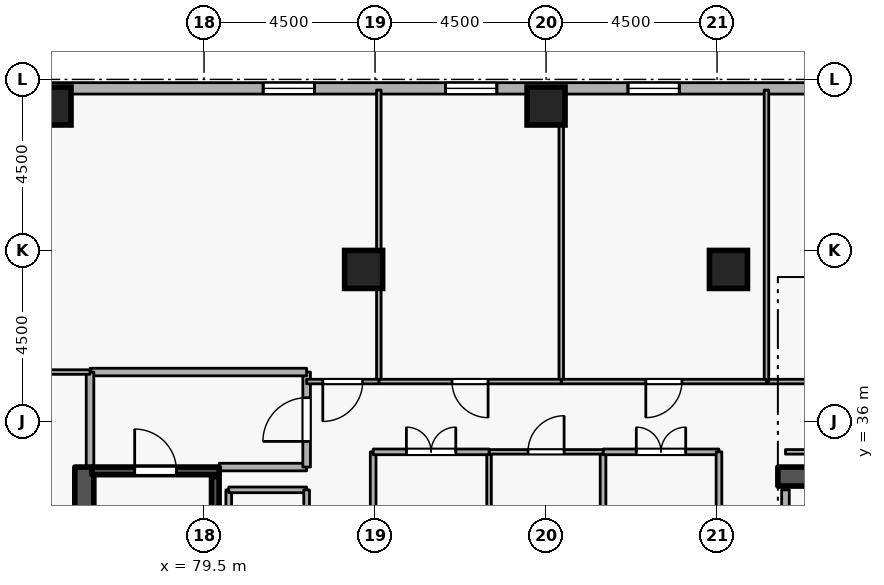
"""IFC4 building model, lengths in metres.
Left out: names, types, materials, properties, quantities, classifications, styles, units other than length and angle.
Written with IfcOpenShell. Run it as: python <this file> out.ifc"""

import sys

from ifc_helpers import new_model, si_unit, direction, frame, frame_2d, origin, origin_2d, place, context, subcontext, project, spatial, rectangle, extrude, element, fill, save


model = new_model("IFC4")
c1 = context("Model", 3, precision=1e-05, world=origin(), true_north=direction((0.0, 1.0)))
c2 = subcontext(c1, "Body", "Model", "MODEL_VIEW")
j1 = project(units=[si_unit("LENGTHUNIT", "METRE"), si_unit("PLANEANGLEUNIT", "RADIAN")], contexts=[c1])
p1 = place(None, origin())
s1 = spatial("IfcSite", under=j1, at=p1, CompositionType="ELEMENT")
p2 = place(p1, origin())
s2 = spatial("IfcBuilding", under=s1, at=p2, CompositionType="ELEMENT")
p3 = place(p2, frame((0.0, 0.0, 218.1)))
s3 = spatial("IfcBuildingStorey", under=s2, at=p3, CompositionType="ELEMENT", Elevation=218.1)
p4 = place(p3, frame((94.6, 34.55, 0.0), z_axis=(0.0, 0.0, 1.0), x_axis=(1.0, 0.0, 0.0)))
e1 = element("IfcWall", 1, at=p4, inside=s3, PredefinedType="SHEAR", context=c2, shape_type="SweptSolid", body=[
    extrude(rectangle(XDim=5.8, YDim=0.5, at=frame_2d((2.9, 0.0))), origin(), (0.0, 0.0, 1.0), 3.6),
])
p5 = place(p3, frame((76.35, 19.2, 0.0), z_axis=(0.0, 0.0, 1.0), x_axis=(0.0, 1.0, 0.0)))
e2 = element("IfcWall", 2, at=p5, inside=s3, PredefinedType="SHEAR", context=c2, shape_type="SweptSolid", body=[
    extrude(rectangle(XDim=15.6, YDim=0.5, at=frame_2d((7.8, 0.0))), origin(), (0.0, 0.0, 1.0), 3.6),
])
for number, where, z_axis, x_axis in (
    (3, (88.5, 44.3, 0.0), (0.0, 0.0, 1.0), (1.0, 0.0, 0.0)),
    (4, (75.5, 44.3, 0.0), (0.0, 0.0, 1.0), (1.0, 0.0, 0.0)),
    (5, (93.3, 40.0, 0.0), (0.0, 0.0, 1.0), (1.0, 0.0, 0.0)),
    (6, (83.7, 40.0, 0.0), (0.0, 0.0, 1.0), (1.0, 0.0, 0.0)),
):
    element("IfcColumn", number, at=place(p3, frame(where, z_axis=z_axis, x_axis=x_axis)), inside=s3, PredefinedType="COLUMN", context=c2, shape_type="SweptSolid", body=[
        extrude(rectangle(XDim=1.0, YDim=1.0, at=origin_2d()), origin(), (0.0, 0.0, 1.0), 3.6),
    ])
p6 = place(p3, frame((103.406, 44.764, 0.0), z_axis=(0.0, 0.0, 1.0), x_axis=(-0.999999999634, 2.7061402e-05, 0.0)))
e7 = element("IfcWall", 7, at=p6, inside=s3, PredefinedType="STANDARD", context=c2, shape_type="SweptSolid", body=[
    extrude(rectangle(XDim=36.087, YDim=0.3, at=frame_2d((18.043, 0.0))), origin(), (0.0, 0.0, 1.0), 2.66),
])
p7 = place(p6, frame((6.6, 0.0, 0.72)))
e8 = element("IfcOpeningElement", 8, at=p7, cuts=e7, PredefinedType="OPENING", context=c2, shape_type="SweptSolid", body=[
    extrude(rectangle(XDim=1.35, YDim=1.05, at=frame_2d((0.675, 0.525))), frame((0.0, 0.16, 0.0), z_axis=(0.0, -1.0, 0.0), x_axis=(1.0, 0.0, 0.0)), (0.0, 0.0, 1.0), 0.32),
])
p8 = place(p6, frame((11.4, 0.0, 0.72)))
e9 = element("IfcOpeningElement", 9, at=p8, cuts=e7, PredefinedType="OPENING", context=c2, shape_type="SweptSolid", body=[
    extrude(rectangle(XDim=1.35, YDim=1.05, at=frame_2d((0.675, 0.525))), frame((0.0, 0.16, 0.0), z_axis=(0.0, -1.0, 0.0), x_axis=(1.0, 0.0, 0.0)), (0.0, 0.0, 1.0), 0.32),
])
p9 = place(p6, frame((16.2, 0.0, 0.72)))
e10 = element("IfcOpeningElement", 10, at=p9, cuts=e7, PredefinedType="OPENING", context=c2, shape_type="SweptSolid", body=[
    extrude(rectangle(XDim=1.35, YDim=1.05, at=frame_2d((0.675, 0.525))), frame((0.0, 0.16, 0.0), z_axis=(0.0, -1.0, 0.0), x_axis=(1.0, 0.0, 0.0)), (0.0, 0.0, 1.0), 0.32),
])
p10 = place(p6, frame((21.0, 0.0, 0.72)))
e11 = element("IfcOpeningElement", 11, at=p10, cuts=e7, PredefinedType="OPENING", context=c2, shape_type="SweptSolid", body=[
    extrude(rectangle(XDim=1.35, YDim=1.05, at=frame_2d((0.675, 0.525))), frame((0.0, 0.16, 0.0), z_axis=(0.0, -1.0, 0.0), x_axis=(1.0, 0.0, 0.0)), (0.0, 0.0, 1.0), 0.32),
])
p11 = place(p6, frame((30.6, 0.0, 0.72)))
e12 = element("IfcOpeningElement", 12, at=p11, cuts=e7, PredefinedType="OPENING", context=c2, shape_type="SweptSolid", body=[
    extrude(rectangle(XDim=1.35, YDim=1.05, at=frame_2d((0.675, 0.525))), frame((0.0, 0.16, 0.0), z_axis=(0.0, -1.0, 0.0), x_axis=(1.0, 0.0, 0.0)), (0.0, 0.0, 1.0), 0.32),
])
p12 = place(p3, frame((76.55, 34.7, 0.0), z_axis=(0.0, 0.0, 1.0), x_axis=(1.0, 0.0, 0.0)))
e13 = element("IfcWall", 13, at=p12, inside=s3, PredefinedType="SHEAR", context=c2, shape_type="SweptSolid", body=[
    extrude(rectangle(XDim=3.35, YDim=0.2, at=frame_2d((1.675, 0.0))), origin(), (0.0, 0.0, 1.0), 3.6),
])
p13 = place(p12, frame((1.125, 0.0, 0.0)))
e14 = element("IfcOpeningElement", 14, at=p13, cuts=e13, PredefinedType="OPENING", context=c2, shape_type="SweptSolid", body=[
    extrude(rectangle(XDim=1.1, YDim=2.1, at=frame_2d((0.55, 1.05))), frame((0.0, 0.11, 0.0), z_axis=(0.0, -1.0, 0.0), x_axis=(1.0, 0.0, 0.0)), (0.0, 0.0, 1.0), 0.22),
])
p14 = place(p3, frame((79.797, 27.45, 0.0), z_axis=(0.0, 0.0, 1.0), x_axis=(0.0, 1.0, 0.0)))
e15 = element("IfcWall", 15, at=p14, inside=s3, PredefinedType="SHEAR", context=c2, shape_type="SweptSolid", body=[
    extrude(rectangle(XDim=7.1, YDim=0.2, at=frame_2d((3.55, 0.0))), origin(), (0.0, 0.0, 1.0), 3.6),
])
p15 = place(p3, frame((79.9, 34.8, 0.0), z_axis=(0.0, 0.0, 1.0), x_axis=(1.0, 0.0, 0.0)))
e16 = element("IfcWall", 16, at=p15, inside=s3, PredefinedType="STANDARD", context=c2, shape_type="SweptSolid", body=[
    extrude(rectangle(XDim=2.3, YDim=0.2, at=frame_2d((1.15, 0.0))), origin(), (0.0, 0.0, 1.0), 2.465),
])
p16 = place(p3, frame((82.2, 34.8, 0.0), z_axis=(0.0, 0.0, 1.0), x_axis=(0.0, 1.0, 0.0)))
e17 = element("IfcWall", 17, at=p16, inside=s3, PredefinedType="STANDARD", context=c2, shape_type="SweptSolid", body=[
    extrude(rectangle(XDim=2.5, YDim=0.2, at=frame_2d((1.25, 0.0))), origin(), (0.0, 0.0, 1.0), 3.26),
])
p17 = place(p16, frame((0.675, 0.0, 0.0)))
e18 = element("IfcOpeningElement", 18, at=p17, cuts=e17, PredefinedType="OPENING", context=c2, shape_type="SweptSolid", body=[
    extrude(rectangle(XDim=1.15, YDim=2.1, at=frame_2d((0.575, 1.05))), frame((0.0, 0.11, 0.0), z_axis=(0.0, -1.0, 0.0), x_axis=(1.0, 0.0, 0.0)), (0.0, 0.0, 1.0), 0.22),
])
p18 = place(p3, frame((82.2, 37.3, 0.0), z_axis=(0.0, 0.0, 1.0), x_axis=(-1.0, 0.0, 0.0)))
e19 = element("IfcWall", 19, at=p18, inside=s3, PredefinedType="STANDARD", context=c2, shape_type="SweptSolid", body=[
    extrude(rectangle(XDim=5.7, YDim=0.2, at=frame_2d((2.85, 0.0))), origin(), (0.0, 0.0, 1.0), 3.26),
])
p19 = place(p3, frame((76.5, 37.3, 0.0), z_axis=(0.0, 0.0, 1.0), x_axis=(0.0, -1.0, 0.0)))
e20 = element("IfcWall", 20, at=p19, inside=s3, PredefinedType="STANDARD", context=c2, shape_type="SweptSolid", body=[
    extrude(rectangle(XDim=2.5, YDim=0.2, at=frame_2d((1.25, 0.0))), origin(), (0.0, 0.0, 1.0), 3.26),
])
p20 = place(p3, frame((94.8, 32.0, 0.0), z_axis=(0.0, 0.0, 1.0), x_axis=(0.0, 1.0, 0.0)))
e21 = element("IfcWall", 21, at=p20, inside=s3, PredefinedType="STANDARD", context=c2, shape_type="SweptSolid", body=[
    extrude(rectangle(XDim=2.2, YDim=0.2, at=frame_2d((1.1, 0.0))), origin(), (0.0, 0.0, 1.0), 3.26),
])
p21 = place(p20, frame((0.525, 0.0, 0.0)))
e22 = element("IfcOpeningElement", 22, at=p21, cuts=e21, PredefinedType="OPENING", context=c2, shape_type="SweptSolid", body=[
    extrude(rectangle(XDim=1.15, YDim=2.1, at=frame_2d((0.575, 1.05))), frame((0.0, 0.11, 0.0), z_axis=(0.0, -1.0, 0.0), x_axis=(1.0, 0.0, 0.0)), (0.0, 0.0, 1.0), 0.22),
])
p22 = place(p3, frame((80.15, 31.85, 0.0), z_axis=(0.0, 0.0, 1.0), x_axis=(0.0, 1.0, 0.0)))
e23 = element("IfcWall", 23, at=p22, inside=s3, PredefinedType="PARTITIONING", context=c2, shape_type="SweptSolid", body=[
    extrude(rectangle(XDim=2.35, YDim=0.15, at=frame_2d((1.175, 0.0))), origin(), (0.0, 0.0, 1.0), 3.26),
])
p23 = place(p3, frame((80.15, 34.2, 0.0), z_axis=(0.0, 0.0, 1.0), x_axis=(1.0, 0.0, 0.0)))
e24 = element("IfcWall", 24, at=p23, inside=s3, PredefinedType="PARTITIONING", context=c2, shape_type="SweptSolid", body=[
    extrude(rectangle(XDim=2.05, YDim=0.15, at=frame_2d((1.025, 0.0))), origin(), (0.0, 0.0, 1.0), 2.465),
])
p24 = place(p3, frame((82.2, 34.2, 0.0), z_axis=(0.0, 0.0, 1.0), x_axis=(0.0, -1.0, 0.0)))
e25 = element("IfcWall", 25, at=p24, inside=s3, PredefinedType="PARTITIONING", context=c2, shape_type="SweptSolid", body=[
    extrude(rectangle(XDim=2.35, YDim=0.15, at=frame_2d((1.175, 0.0))), origin(), (0.0, 0.0, 1.0), 3.26),
])
p25 = place(p24, frame((0.715, 0.0, 0.0)))
e26 = element("IfcOpeningElement", 26, at=p25, cuts=e25, PredefinedType="OPENING", context=c2, shape_type="SweptSolid", body=[
    extrude(rectangle(XDim=0.92, YDim=2.08, at=frame_2d((0.46, 1.04))), frame((0.0, 0.085, 0.0), z_axis=(0.0, -1.0, 0.0), x_axis=(1.0, 0.0, 0.0)), (0.0, 0.0, 1.0), 0.17),
])
p26 = place(p3, frame((94.8, 35.2, 0.0), z_axis=(0.0, 0.0, 1.0), x_axis=(1.0, 0.0, 0.0)))
e27 = element("IfcWall", 27, at=p26, inside=s3, PredefinedType="PARTITIONING", context=c2, shape_type="SweptSolid", body=[
    extrude(rectangle(XDim=5.9, YDim=0.12, at=frame_2d((2.95, 0.0))), origin(), (0.0, 0.0, 1.0), 3.26),
])
p27 = place(p3, frame((100.7, 37.05, 0.0), z_axis=(0.0, 0.0, 1.0), x_axis=(-1.0, 0.0, 0.0)))
e28 = element("IfcWall", 28, at=p27, inside=s3, PredefinedType="PARTITIONING", context=c2, shape_type="SweptSolid", body=[
    extrude(rectangle(XDim=6.4, YDim=0.12, at=frame_2d((3.2, 0.0))), origin(), (0.0, 0.0, 1.0), 3.26),
])
p28 = place(p27, frame((2.675, 0.0, 0.0)))
e29 = element("IfcOpeningElement", 29, at=p28, cuts=e28, PredefinedType="OPENING", context=c2, shape_type="SweptSolid", body=[
    extrude(rectangle(XDim=1.05, YDim=2.1, at=frame_2d((0.525, 1.05))), frame((0.0, 0.07, 0.0), z_axis=(0.0, -1.0, 0.0), x_axis=(1.0, 0.0, 0.0)), (0.0, 0.0, 1.0), 0.14),
])
for number, where, z_axis, x_axis in (
    (30, (94.3, 37.05, 0.0), (0.0, 0.0, 1.0), (0.0, 1.0, 0.0)),
    (31, (88.9, 37.05, 0.0), (0.0, 0.0, 1.0), (0.0, 1.0, 0.0)),
):
    element("IfcWall", number, at=place(p3, frame(where, z_axis=z_axis, x_axis=x_axis)), inside=s3, PredefinedType="PARTITIONING", context=c2, shape_type="SweptSolid", body=[
        extrude(rectangle(XDim=7.67, YDim=0.12, at=frame_2d((3.835, 0.0))), origin(), (0.0, 0.0, 1.0), 3.26),
    ])
p29 = place(p3, frame((94.3, 37.05, 0.0), z_axis=(0.0, 0.0, 1.0), x_axis=(-1.0, 0.0, 0.0)))
e32 = element("IfcWall", 32, at=p29, inside=s3, PredefinedType="PARTITIONING", context=c2, shape_type="SweptSolid", body=[
    extrude(rectangle(XDim=5.4, YDim=0.12, at=frame_2d((2.7, 0.0))), origin(), (0.0, 0.0, 1.0), 3.26),
])
p30 = place(p29, frame((2.225, 0.0, 0.0)))
e33 = element("IfcOpeningElement", 33, at=p30, cuts=e32, PredefinedType="OPENING", context=c2, shape_type="SweptSolid", body=[
    extrude(rectangle(XDim=0.95, YDim=2.1, at=frame_2d((0.475, 1.05))), frame((0.0, 0.07, 0.0), z_axis=(0.0, -1.0, 0.0), x_axis=(1.0, 0.0, 0.0)), (0.0, 0.0, 1.0), 0.14),
])
p31 = place(p3, frame((84.1, 37.05, 0.0), z_axis=(0.0, 0.0, 1.0), x_axis=(0.0, 1.0, 0.0)))
e34 = element("IfcWall", 34, at=p31, inside=s3, PredefinedType="PARTITIONING", context=c2, shape_type="SweptSolid", body=[
    extrude(rectangle(XDim=7.67, YDim=0.12, at=frame_2d((3.835, 0.0))), origin(), (0.0, 0.0, 1.0), 3.26),
])
p32 = place(p3, frame((88.9, 37.05, 0.0), z_axis=(0.0, 0.0, 1.0), x_axis=(-1.0, 0.0, 0.0)))
e35 = element("IfcWall", 35, at=p32, inside=s3, PredefinedType="PARTITIONING", context=c2, shape_type="SweptSolid", body=[
    extrude(rectangle(XDim=4.8, YDim=0.12, at=frame_2d((2.4, 0.0))), origin(), (0.0, 0.0, 1.0), 3.26),
])
p33 = place(p32, frame((1.925, 0.0, 0.0)))
e36 = element("IfcOpeningElement", 36, at=p33, cuts=e35, PredefinedType="OPENING", context=c2, shape_type="SweptSolid", body=[
    extrude(rectangle(XDim=0.95, YDim=2.1, at=frame_2d((0.475, 1.05))), frame((0.0, 0.07, 0.0), z_axis=(0.0, -1.0, 0.0), x_axis=(1.0, 0.0, 0.0)), (0.0, 0.0, 1.0), 0.14),
])
p34 = place(p3, frame((76.5, 37.3, 0.0), z_axis=(0.0, 0.0, 1.0), x_axis=(-1.0, 0.0, 0.0)))
e37 = element("IfcWall", 37, at=p34, inside=s3, PredefinedType="PARTITIONING", context=c2, shape_type="SweptSolid", body=[
    extrude(rectangle(XDim=11.72, YDim=0.12, at=frame_2d((5.86, 0.0))), origin(), (0.0, 0.0, 1.0), 3.26),
])
p35 = place(p3, frame((84.1, 37.05, 0.0), z_axis=(0.0, 0.0, 1.0), x_axis=(-1.0, 0.0, 0.0)))
e38 = element("IfcWall", 38, at=p35, inside=s3, PredefinedType="PARTITIONING", context=c2, shape_type="SweptSolid", body=[
    extrude(rectangle(XDim=1.9, YDim=0.12, at=frame_2d((0.95, 0.0))), origin(), (0.0, 0.0, 1.0), 3.26),
])
p36 = place(p35, frame((0.425, 0.0, 0.0)))
e39 = element("IfcOpeningElement", 39, at=p36, cuts=e38, PredefinedType="OPENING", context=c2, shape_type="SweptSolid", body=[
    extrude(rectangle(XDim=1.05, YDim=2.1, at=frame_2d((0.525, 1.05))), frame((0.0, 0.07, 0.0), z_axis=(0.0, -1.0, 0.0), x_axis=(1.0, 0.0, 0.0)), (0.0, 0.0, 1.0), 0.14),
])
p37 = place(p3, frame((90.0, 32.2, 0.0), z_axis=(0.0, 0.0, 1.0), x_axis=(0.0, 1.0, 0.0)))
e40 = element("IfcWall", 40, at=p37, inside=s3, PredefinedType="PARTITIONING", context=c2, shape_type="SweptSolid", body=[
    extrude(rectangle(XDim=3.0, YDim=0.15, at=frame_2d((1.5, 0.0))), origin(), (0.0, 0.0, 1.0), 3.26),
])
p38 = place(p3, frame((90.0, 35.2, 0.0), z_axis=(0.0, 0.0, 1.0), x_axis=(1.0, 0.0, 0.0)))
e41 = element("IfcWall", 41, at=p38, inside=s3, PredefinedType="PARTITIONING", context=c2, shape_type="SweptSolid", body=[
    extrude(rectangle(XDim=3.05, YDim=0.15, at=frame_2d((1.525, 0.0))), origin(), (0.0, 0.0, 1.0), 3.26),
])
p39 = place(p38, frame((0.875, 0.0, 0.0)))
e42 = element("IfcOpeningElement", 42, at=p39, cuts=e41, PredefinedType="OPENING", context=c2, shape_type="SweptSolid", body=[
    extrude(rectangle(XDim=1.3, YDim=2.12, at=frame_2d((0.65, 1.06))), frame((0.0, 0.085, 0.0), z_axis=(0.0, -1.0, 0.0), x_axis=(1.0, 0.0, 0.0)), (0.0, 0.0, 1.0), 0.17),
])
p40 = place(p3, frame((93.05, 35.2, 0.0), z_axis=(0.0, 0.0, 1.0), x_axis=(0.0, -1.0, 0.0)))
e43 = element("IfcWall", 43, at=p40, inside=s3, PredefinedType="PARTITIONING", context=c2, shape_type="SweptSolid", body=[
    extrude(rectangle(XDim=3.0, YDim=0.15, at=frame_2d((1.5, 0.0))), origin(), (0.0, 0.0, 1.0), 3.26),
])
p41 = place(p3, frame((87.0, 32.2, 0.0), z_axis=(0.0, 0.0, 1.0), x_axis=(0.0, 1.0, 0.0)))
e44 = element("IfcWall", 44, at=p41, inside=s3, PredefinedType="PARTITIONING", context=c2, shape_type="SweptSolid", body=[
    extrude(rectangle(XDim=3.0, YDim=0.12, at=frame_2d((1.5, 0.0))), origin(), (0.0, 0.0, 1.0), 3.26),
])
p42 = place(p3, frame((87.0, 35.2, 0.0), z_axis=(0.0, 0.0, 1.0), x_axis=(1.0, 0.0, 0.0)))
e45 = element("IfcWall", 45, at=p42, inside=s3, PredefinedType="PARTITIONING", context=c2, shape_type="SweptSolid", body=[
    extrude(rectangle(XDim=3.0, YDim=0.12, at=frame_2d((1.5, 0.0))), origin(), (0.0, 0.0, 1.0), 3.26),
])
p43 = place(p42, frame((1.025, 0.0, 0.0)))
e46 = element("IfcOpeningElement", 46, at=p43, cuts=e45, PredefinedType="OPENING", context=c2, shape_type="SweptSolid", body=[
    extrude(rectangle(XDim=0.95, YDim=2.1, at=frame_2d((0.475, 1.05))), frame((0.0, 0.07, 0.0), z_axis=(0.0, -1.0, 0.0), x_axis=(1.0, 0.0, 0.0)), (0.0, 0.0, 1.0), 0.14),
])
p44 = place(p3, frame((83.95, 32.2, 0.0), z_axis=(0.0, 0.0, 1.0), x_axis=(0.0, 1.0, 0.0)))
e47 = element("IfcWall", 47, at=p44, inside=s3, PredefinedType="PARTITIONING", context=c2, shape_type="SweptSolid", body=[
    extrude(rectangle(XDim=3.0, YDim=0.15, at=frame_2d((1.5, 0.0))), origin(), (0.0, 0.0, 1.0), 3.26),
])
p45 = place(p3, frame((83.95, 35.2, 0.0), z_axis=(0.0, 0.0, 1.0), x_axis=(1.0, 0.0, 0.0)))
e48 = element("IfcWall", 48, at=p45, inside=s3, PredefinedType="PARTITIONING", context=c2, shape_type="SweptSolid", body=[
    extrude(rectangle(XDim=3.05, YDim=0.15, at=frame_2d((1.525, 0.0))), origin(), (0.0, 0.0, 1.0), 3.26),
])
p46 = place(p45, frame((0.875, 0.0, 0.0)))
e49 = element("IfcOpeningElement", 49, at=p46, cuts=e48, PredefinedType="OPENING", context=c2, shape_type="SweptSolid", body=[
    extrude(rectangle(XDim=1.3, YDim=2.12, at=frame_2d((0.65, 1.06))), frame((0.0, 0.085, 0.0), z_axis=(0.0, -1.0, 0.0), x_axis=(1.0, 0.0, 0.0)), (0.0, 0.0, 1.0), 0.17),
])
p47 = place(p8, origin())
e50 = element("IfcWindow", 50, at=p47, inside=s3, PartitioningType="SINGLE_PANEL", PredefinedType="WINDOW", context=c2, shape_type="SweptSolid", body=[
    extrude(rectangle(XDim=1.35, YDim=1.05, at=frame_2d((0.675, 0.525))), frame((0.0, 0.03, 0.0), z_axis=(0.0, -1.0, 0.0), x_axis=(1.0, 0.0, 0.0)), (0.0, 0.0, 1.0), 0.06),
])
fill(e9, e50)
p48 = place(p9, origin())
e51 = element("IfcWindow", 51, at=p48, inside=s3, PartitioningType="SINGLE_PANEL", PredefinedType="WINDOW", context=c2, shape_type="SweptSolid", body=[
    extrude(rectangle(XDim=1.35, YDim=1.05, at=frame_2d((0.675, 0.525))), frame((0.0, 0.03, 0.0), z_axis=(0.0, -1.0, 0.0), x_axis=(1.0, 0.0, 0.0)), (0.0, 0.0, 1.0), 0.06),
])
fill(e10, e51)
p49 = place(p10, origin())
e52 = element("IfcWindow", 52, at=p49, inside=s3, PartitioningType="SINGLE_PANEL", PredefinedType="WINDOW", context=c2, shape_type="SweptSolid", body=[
    extrude(rectangle(XDim=1.35, YDim=1.05, at=frame_2d((0.675, 0.525))), frame((0.0, 0.03, 0.0), z_axis=(0.0, -1.0, 0.0), x_axis=(1.0, 0.0, 0.0)), (0.0, 0.0, 1.0), 0.06),
])
fill(e11, e52)
p50 = place(p13, origin())
e53 = element("IfcDoor", 53, at=p50, inside=s3, OperationType="SINGLE_SWING_LEFT", PredefinedType="DOOR", context=c2, shape_type="SweptSolid", body=[
    extrude(rectangle(XDim=1.1, YDim=2.1, at=frame_2d((0.55, 1.05))), frame((0.0, 0.025, 0.0), z_axis=(0.0, -1.0, 0.0), x_axis=(1.0, 0.0, 0.0)), (0.0, 0.0, 1.0), 0.05),
])
fill(e14, e53)
p51 = place(p17, origin())
e54 = element("IfcDoor", 54, at=p51, inside=s3, OperationType="SINGLE_SWING_LEFT", PredefinedType="DOOR", context=c2, shape_type="SweptSolid", body=[
    extrude(rectangle(XDim=1.15, YDim=2.1, at=frame_2d((0.575, 1.05))), frame((0.0, 0.025, 0.0), z_axis=(0.0, -1.0, 0.0), x_axis=(1.0, 0.0, 0.0)), (0.0, 0.0, 1.0), 0.05),
])
fill(e18, e54)
p52 = place(p30, origin())
e55 = element("IfcDoor", 55, at=p52, inside=s3, OperationType="SINGLE_SWING_RIGHT", PredefinedType="DOOR", context=c2, shape_type="SweptSolid", body=[
    extrude(rectangle(XDim=0.95, YDim=2.1, at=frame_2d((0.475, 1.05))), frame((0.0, 0.025, 0.0), z_axis=(0.0, -1.0, 0.0), x_axis=(1.0, 0.0, 0.0)), (0.0, 0.0, 1.0), 0.05),
])
fill(e33, e55)
p53 = place(p33, origin())
e56 = element("IfcDoor", 56, at=p53, inside=s3, OperationType="SINGLE_SWING_LEFT", PredefinedType="DOOR", context=c2, shape_type="SweptSolid", body=[
    extrude(rectangle(XDim=0.95, YDim=2.1, at=frame_2d((0.475, 1.05))), frame((0.0, 0.025, 0.0), z_axis=(0.0, -1.0, 0.0), x_axis=(1.0, 0.0, 0.0)), (0.0, 0.0, 1.0), 0.05),
])
fill(e36, e56)
p54 = place(p36, origin())
e57 = element("IfcDoor", 57, at=p54, inside=s3, OperationType="SINGLE_SWING_RIGHT", PredefinedType="DOOR", context=c2, shape_type="SweptSolid", body=[
    extrude(rectangle(XDim=1.05, YDim=2.1, at=frame_2d((0.525, 1.05))), frame((0.0, 0.025, 0.0), z_axis=(0.0, -1.0, 0.0), x_axis=(1.0, 0.0, 0.0)), (0.0, 0.0, 1.0), 0.05),
])
fill(e39, e57)
p55 = place(p39, origin())
e58 = element("IfcDoor", 58, at=p55, inside=s3, OperationType="DOUBLE_DOOR_SINGLE_SWING", PredefinedType="DOOR", context=c2, shape_type="SweptSolid", body=[
    extrude(rectangle(XDim=1.3, YDim=2.12, at=frame_2d((0.65, 1.06))), frame((0.0, 0.025, 0.0), z_axis=(0.0, -1.0, 0.0), x_axis=(1.0, 0.0, 0.0)), (0.0, 0.0, 1.0), 0.05),
])
fill(e42, e58)
p56 = place(p43, origin())
e59 = element("IfcDoor", 59, at=p56, inside=s3, OperationType="SINGLE_SWING_RIGHT", PredefinedType="DOOR", context=c2, shape_type="SweptSolid", body=[
    extrude(rectangle(XDim=0.95, YDim=2.1, at=frame_2d((0.475, 1.05))), frame((0.0, 0.025, 0.0), z_axis=(0.0, -1.0, 0.0), x_axis=(1.0, 0.0, 0.0)), (0.0, 0.0, 1.0), 0.05),
])
fill(e46, e59)
p57 = place(p46, origin())
e60 = element("IfcDoor", 60, at=p57, inside=s3, OperationType="DOUBLE_DOOR_SINGLE_SWING", PredefinedType="DOOR", context=c2, shape_type="SweptSolid", body=[
    extrude(rectangle(XDim=1.3, YDim=2.12, at=frame_2d((0.65, 1.06))), frame((0.0, 0.025, 0.0), z_axis=(0.0, -1.0, 0.0), x_axis=(1.0, 0.0, 0.0)), (0.0, 0.0, 1.0), 0.05),
])
fill(e49, e60)
save(model, sys.argv[1])
